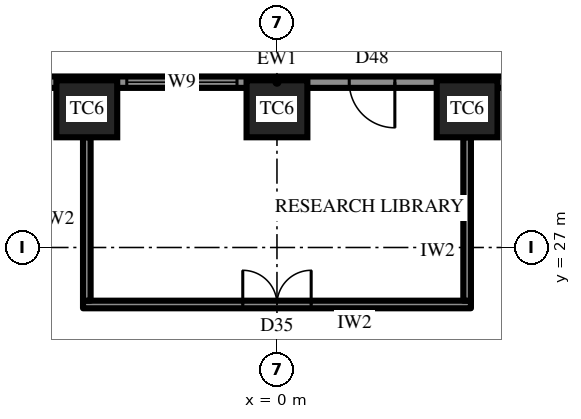
"""IFC4 building model, lengths in metres.
Left out: names, types, materials, properties, quantities, classifications, styles, units other than length and angle.
Written with IfcOpenShell. Run it as: python <this file> out.ifc"""

import sys

from ifc_helpers import new_model, si_unit, direction, frame, frame_2d, origin, origin_2d, place, context, subcontext, project, spatial, rectangle, extrude, element, fill, save


model = new_model("IFC4")
c1 = context("Model", 3, precision=1e-05, world=origin(), true_north=direction((0.0, 1.0)))
c2 = subcontext(c1, "Body", "Model", "MODEL_VIEW")
j1 = project(units=[si_unit("LENGTHUNIT", "METRE"), si_unit("PLANEANGLEUNIT", "RADIAN")], contexts=[c1])
p1 = place(None, origin())
s1 = spatial("IfcSite", under=j1, at=p1, CompositionType="ELEMENT")
p2 = place(p1, origin())
s2 = spatial("IfcBuilding", under=s1, at=p2, CompositionType="ELEMENT")
p3 = place(p2, frame((0.0, 0.0, 153.1)))
s3 = spatial("IfcBuildingStorey", under=s2, at=p3, CompositionType="ELEMENT", Elevation=153.1)
for number, where, z_axis, x_axis in (
    (1, (5.004, 30.65, 0.0), (0.0, 0.0, 1.0), (-1.0, 0.0, 0.0)),
    (2, (0.0, 30.65, 0.0), (0.0, 0.0, 1.0), (-1.0, 0.0, 0.0)),
    (3, (-5.004, 30.65, 0.0), (0.0, 0.0, 1.0), (-1.0, 0.0, 0.0)),
):
    element("IfcColumn", number, at=place(p3, frame(where, z_axis=z_axis, x_axis=x_axis)), inside=s3, PredefinedType="COLUMN", context=c2, shape_type="SweptSolid", body=[
        extrude(rectangle(XDim=1.6, YDim=1.5, at=origin_2d()), origin(), (0.0, 0.0, 1.0), 4.2),
    ])
p4 = place(p3, frame((15.011, 31.35, 0.0), z_axis=(0.0, 0.0, 1.0), x_axis=(-1.0, 0.0, 0.0)))
e4 = element("IfcWall", 4, at=p4, inside=s3, PredefinedType="SOLIDWALL", context=c2, shape_type="SweptSolid", body=[
    extrude(rectangle(XDim=30.022, YDim=0.3, at=frame_2d((15.011, 0.0))), origin(), (0.0, 0.0, 1.0), 2.75),
])
p5 = place(p4, frame((1.052, 0.0, 0.6)))
e5 = element("IfcOpeningElement", 5, at=p5, cuts=e4, PredefinedType="OPENING", context=c2, shape_type="SweptSolid", body=[
    extrude(rectangle(XDim=2.9, YDim=1.9, at=frame_2d((1.45, 0.95))), frame((0.0, 0.16, 0.0), z_axis=(0.0, -1.0, 0.0), x_axis=(1.0, 0.0, 0.0)), (0.0, 0.0, 1.0), 0.32),
])
p6 = place(p4, frame((6.056, 0.0, 0.6)))
e6 = element("IfcOpeningElement", 6, at=p6, cuts=e4, PredefinedType="OPENING", context=c2, shape_type="SweptSolid", body=[
    extrude(rectangle(XDim=2.9, YDim=1.9, at=frame_2d((1.45, 0.95))), frame((0.0, 0.16, 0.0), z_axis=(0.0, -1.0, 0.0), x_axis=(1.0, 0.0, 0.0)), (0.0, 0.0, 1.0), 0.32),
])
p7 = place(p4, frame((11.909, 0.0, 0.0)))
e7 = element("IfcOpeningElement", 7, at=p7, cuts=e4, PredefinedType="OPENING", context=c2, shape_type="SweptSolid", body=[
    extrude(rectangle(XDim=1.2, YDim=2.4, at=frame_2d((0.6, 1.2))), frame((0.0, 0.16, 0.0), z_axis=(0.0, -1.0, 0.0), x_axis=(1.0, 0.0, 0.0)), (0.0, 0.0, 1.0), 0.32),
])
p8 = place(p4, frame((16.063, 0.0, 0.6)))
e8 = element("IfcOpeningElement", 8, at=p8, cuts=e4, PredefinedType="OPENING", context=c2, shape_type="SweptSolid", body=[
    extrude(rectangle(XDim=2.9, YDim=1.9, at=frame_2d((1.45, 0.95))), frame((0.0, 0.16, 0.0), z_axis=(0.0, -1.0, 0.0), x_axis=(1.0, 0.0, 0.0)), (0.0, 0.0, 1.0), 0.32),
])
p9 = place(p4, frame((21.067, 0.0, 0.6)))
e9 = element("IfcOpeningElement", 9, at=p9, cuts=e4, PredefinedType="OPENING", context=c2, shape_type="SweptSolid", body=[
    extrude(rectangle(XDim=2.9, YDim=1.9, at=frame_2d((1.45, 0.95))), frame((0.0, 0.16, 0.0), z_axis=(0.0, -1.0, 0.0), x_axis=(1.0, 0.0, 0.0)), (0.0, 0.0, 1.0), 0.32),
])
p10 = place(p4, frame((26.07, 0.0, 0.6)))
e10 = element("IfcOpeningElement", 10, at=p10, cuts=e4, PredefinedType="OPENING", context=c2, shape_type="SweptSolid", body=[
    extrude(rectangle(XDim=2.9, YDim=1.9, at=frame_2d((1.45, 0.95))), frame((0.0, 0.16, 0.0), z_axis=(0.0, -1.0, 0.0), x_axis=(1.0, 0.0, 0.0)), (0.0, 0.0, 1.0), 0.32),
])
p11 = place(p3, frame((5.104, 25.5, 0.0), z_axis=(0.0, 0.0, 1.0), x_axis=(-1.0, 0.0, 0.0)))
e11 = element("IfcWall", 11, at=p11, inside=s3, PredefinedType="PARTITIONING", context=c2, shape_type="SweptSolid", body=[
    extrude(rectangle(XDim=10.208, YDim=0.2, at=frame_2d((5.104, 0.0))), origin(), (0.0, 0.0, 1.0), 4.0),
])
p12 = place(p11, frame((4.204, 0.0, 0.0)))
e12 = element("IfcOpeningElement", 12, at=p12, cuts=e11, PredefinedType="OPENING", context=c2, shape_type="SweptSolid", body=[
    extrude(rectangle(XDim=1.8, YDim=2.4, at=frame_2d((0.9, 1.2))), frame((0.0, 0.11, 0.0), z_axis=(0.0, -1.0, 0.0), x_axis=(1.0, 0.0, 0.0)), (0.0, 0.0, 1.0), 0.22),
])
for number, where, z_axis, x_axis in (
    (13, (5.004, 25.6, 0.0), (0.0, 0.0, 1.0), (0.0, 1.0, 0.0)),
    (14, (-5.004, 25.6, 0.0), (0.0, 0.0, 1.0), (0.0, 1.0, 0.0)),
):
    element("IfcWall", number, at=place(p3, frame(where, z_axis=z_axis, x_axis=x_axis)), inside=s3, PredefinedType="PARTITIONING", context=c2, shape_type="SweptSolid", body=[
        extrude(rectangle(XDim=4.3, YDim=0.2, at=frame_2d((2.15, 0.0))), origin(), (0.0, 0.0, 1.0), 2.992),
    ])
p13 = place(p7, origin())
e15 = element("IfcDoor", 15, at=p13, inside=s3, OperationType="SINGLE_SWING_RIGHT", PredefinedType="DOOR", context=c2, shape_type="SweptSolid", body=[
    extrude(rectangle(XDim=1.2, YDim=2.4, at=frame_2d((0.6, 1.2))), frame((0.0, 0.025, 0.0), z_axis=(0.0, -1.0, 0.0), x_axis=(1.0, 0.0, 0.0)), (0.0, 0.0, 1.0), 0.05),
])
fill(e7, e15)
p14 = place(p8, origin())
e16 = element("IfcWindow", 16, at=p14, inside=s3, PartitioningType="SINGLE_PANEL", PredefinedType="WINDOW", context=c2, shape_type="SweptSolid", body=[
    extrude(rectangle(XDim=2.9, YDim=1.9, at=frame_2d((1.45, 0.95))), frame((0.0, 0.03, 0.0), z_axis=(0.0, -1.0, 0.0), x_axis=(1.0, 0.0, 0.0)), (0.0, 0.0, 1.0), 0.06),
])
fill(e8, e16)
p15 = place(p12, frame((1.8, 0.0, 0.0), z_axis=(0.0, 0.0, 1.0), x_axis=(-1.0, 0.0, 0.0)))
e17 = element("IfcDoor", 17, at=p15, inside=s3, OperationType="DOUBLE_DOOR_SINGLE_SWING", PredefinedType="DOOR", context=c2, shape_type="SweptSolid", body=[
    extrude(rectangle(XDim=1.8, YDim=2.4, at=frame_2d((0.9, 1.2))), frame((0.0, 0.025, 0.0), z_axis=(0.0, -1.0, 0.0), x_axis=(1.0, 0.0, 0.0)), (0.0, 0.0, 1.0), 0.05),
])
fill(e12, e17)
save(model, sys.argv[1])
